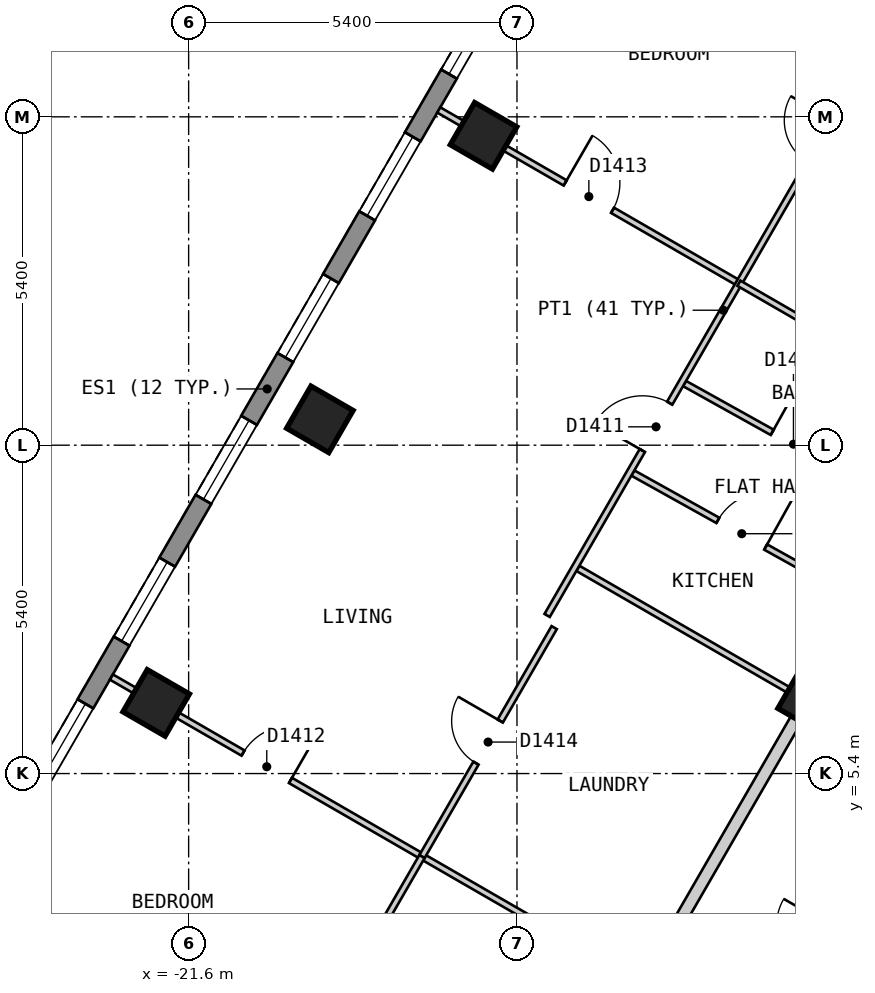
"""IFC4 building model, lengths in metres.
Left out: names, types, materials, properties, quantities, classifications, styles, units other than length and angle.
Written with IfcOpenShell. Run it as: python <this file> out.ifc"""

import sys

from ifc_helpers import new_model, si_unit, direction, frame, frame_2d, origin, origin_2d, place, context, subcontext, project, spatial, polyline, rectangle, outline, extrude, element, fill, save


model = new_model("IFC4")
c1 = context("Model", 3, precision=1e-05, world=origin(), true_north=direction((0.0, 1.0)))
c2 = subcontext(c1, "Body", "Model", "MODEL_VIEW")
j1 = project(units=[si_unit("LENGTHUNIT", "METRE"), si_unit("PLANEANGLEUNIT", "RADIAN")], contexts=[c1])
p1 = place(None, origin())
s1 = spatial("IfcSite", under=j1, at=p1, CompositionType="ELEMENT")
p2 = place(p1, origin())
s2 = spatial("IfcBuilding", under=s1, at=p2, CompositionType="ELEMENT")
p3 = place(p2, frame((0.0, 0.0, 178.2)))
s3 = spatial("IfcBuildingStorey", under=s2, at=p3, CompositionType="ELEMENT", Elevation=178.2)
for number, where, z_axis, x_axis in (
    (1, (-16.75, 15.888, 0.0), (0.0, 0.0, 1.0), (-0.5, -0.866, 0.0)),
    (2, (-19.442, 11.225, 0.0), (0.0, 0.0, 1.0), (-0.5, -0.866, 0.0)),
    (3, (-22.134, 6.562, 0.0), (0.0, 0.0, 1.0), (-0.5, -0.866, 0.0)),
):
    element("IfcColumn", number, at=place(p3, frame(where, z_axis=z_axis, x_axis=x_axis)), inside=s3, PredefinedType="COLUMN", context=c2, shape_type="SweptSolid", body=[
        extrude(rectangle(XDim=0.8, YDim=0.8, at=origin_2d()), origin(), (0.0, 0.0, 1.0), 3.0),
    ])
p4 = place(p3, frame((-11.431, 6.6, 0.0), z_axis=(0.0, 0.0, 1.0), x_axis=(-0.5, -0.866025403784, 0.0)))
e4 = element("IfcColumn", 4, at=p4, inside=s3, PredefinedType="COLUMN", context=c2, shape_type="SweptSolid", body=[
    extrude(rectangle(XDim=0.7, YDim=0.7, at=origin_2d()), origin(), (0.0, 0.0, 1.0), 3.0),
])
p5 = place(p3, frame((-14.592, 21.625, 0.0), z_axis=(0.0, 0.0, 1.0), x_axis=(-0.500010537973, -0.866019319597, 0.0)))
e5 = element("IfcWall", 5, at=p5, inside=s3, PredefinedType="SOLIDWALL", context=c2, shape_type="SweptSolid", body=[
    extrude(outline(polyline([(0.0, -0.15), (22.863, -0.15), (22.783, 0.15), (0.08, 0.15), (0.0, -0.15)])), origin(), (0.0, 0.0, 1.0), 2.7),
])
p6 = place(p5, frame((1.259, 0.0, 0.15)))
e6 = element("IfcOpeningElement", 6, at=p6, cuts=e5, PredefinedType="OPENING", context=c2, shape_type="SweptSolid", body=[
    extrude(rectangle(XDim=1.5, YDim=2.1, at=frame_2d((0.75, 1.05))), frame((0.0, 0.16, 0.0), z_axis=(0.0, -1.0, 0.0), x_axis=(1.0, 0.0, 0.0)), (0.0, 0.0, 1.0), 0.32),
])
p7 = place(p5, frame((3.952, 0.0, 0.15)))
e7 = element("IfcOpeningElement", 7, at=p7, cuts=e5, PredefinedType="OPENING", context=c2, shape_type="SweptSolid", body=[
    extrude(rectangle(XDim=1.5, YDim=2.1, at=frame_2d((0.75, 1.05))), frame((0.0, 0.16, 0.0), z_axis=(0.0, -1.0, 0.0), x_axis=(1.0, 0.0, 0.0)), (0.0, 0.0, 1.0), 0.32),
])
p8 = place(p5, frame((6.644, 0.0, 0.15)))
e8 = element("IfcOpeningElement", 8, at=p8, cuts=e5, PredefinedType="OPENING", context=c2, shape_type="SweptSolid", body=[
    extrude(rectangle(XDim=1.5, YDim=2.1, at=frame_2d((0.75, 1.05))), frame((0.0, 0.16, 0.0), z_axis=(0.0, -1.0, 0.0), x_axis=(1.0, 0.0, 0.0)), (0.0, 0.0, 1.0), 0.32),
])
p9 = place(p5, frame((9.335, 0.0, 0.15)))
e9 = element("IfcOpeningElement", 9, at=p9, cuts=e5, PredefinedType="OPENING", context=c2, shape_type="SweptSolid", body=[
    extrude(rectangle(XDim=1.5, YDim=2.1, at=frame_2d((0.75, 1.05))), frame((0.0, 0.16, 0.0), z_axis=(0.0, -1.0, 0.0), x_axis=(1.0, 0.0, 0.0)), (0.0, 0.0, 1.0), 0.32),
])
p10 = place(p5, frame((12.028, 0.0, 0.15)))
e10 = element("IfcOpeningElement", 10, at=p10, cuts=e5, PredefinedType="OPENING", context=c2, shape_type="SweptSolid", body=[
    extrude(rectangle(XDim=1.5, YDim=2.1, at=frame_2d((0.75, 1.05))), frame((0.0, 0.16, 0.0), z_axis=(0.0, -1.0, 0.0), x_axis=(1.0, 0.0, 0.0)), (0.0, 0.0, 1.0), 0.32),
])
p11 = place(p5, frame((14.72, 0.0, 0.15)))
e11 = element("IfcOpeningElement", 11, at=p11, cuts=e5, PredefinedType="OPENING", context=c2, shape_type="SweptSolid", body=[
    extrude(rectangle(XDim=1.5, YDim=2.1, at=frame_2d((0.75, 1.05))), frame((0.0, 0.16, 0.0), z_axis=(0.0, -1.0, 0.0), x_axis=(1.0, 0.0, 0.0)), (0.0, 0.0, 1.0), 0.32),
])
p12 = place(p5, frame((17.411, 0.0, 0.15)))
e12 = element("IfcOpeningElement", 12, at=p12, cuts=e5, PredefinedType="OPENING", context=c2, shape_type="SweptSolid", body=[
    extrude(rectangle(XDim=1.5, YDim=2.1, at=frame_2d((0.75, 1.05))), frame((0.0, 0.16, 0.0), z_axis=(0.0, -1.0, 0.0), x_axis=(1.0, 0.0, 0.0)), (0.0, 0.0, 1.0), 0.32),
])
p13 = place(p5, frame((20.104, 0.0, 0.15)))
e13 = element("IfcOpeningElement", 13, at=p13, cuts=e5, PredefinedType="OPENING", context=c2, shape_type="SweptSolid", body=[
    extrude(rectangle(XDim=1.5, YDim=2.1, at=frame_2d((0.75, 1.05))), frame((0.0, 0.16, 0.0), z_axis=(0.0, -1.0, 0.0), x_axis=(1.0, 0.0, 0.0)), (0.0, 0.0, 1.0), 0.32),
])
p14 = place(p3, frame((-13.048, -0.601, 0.0), z_axis=(0.0, 0.0, 1.0), x_axis=(0.499982180423, 0.866035691677, 0.0)))
e14 = element("IfcWall", 14, at=p14, inside=s3, PredefinedType="PARTITIONING", context=c2, shape_type="SweptSolid", body=[
    extrude(rectangle(XDim=7.16, YDim=0.2, at=frame_2d((3.58, 0.0))), origin(), (0.0, 0.0, 1.0), 2.7),
])
p15 = place(p14, frame((3.13, 0.0, 0.0)))
e15 = element("IfcOpeningElement", 15, at=p15, cuts=e14, PredefinedType="OPENING", context=c2, shape_type="SweptSolid", body=[
    extrude(rectangle(XDim=0.9, YDim=2.1, at=frame_2d((0.45, 1.05))), frame((0.0, 0.11, 0.0), z_axis=(0.0, -1.0, 0.0), x_axis=(1.0, 0.0, 0.0)), (0.0, 0.0, 1.0), 0.22),
])
p16 = place(p3, frame((-15.53, -0.501, 0.0), z_axis=(0.0, 0.0, 1.0), x_axis=(0.499952498232, 0.866052827206, 0.0)))
e16 = element("IfcWall", 16, at=p16, inside=s3, PredefinedType="PARTITIONING", context=c2, shape_type="SweptSolid", body=[
    extrude(rectangle(XDim=9.585, YDim=0.2, at=frame_2d((4.792, 0.0))), origin(), (0.0, 0.0, 1.0), 2.7),
])
p17 = place(p3, frame((-13.444, 11.814, 0.0), z_axis=(0.0, 0.0, 1.0), x_axis=(0.873653620945, -0.486548405207, 0.0)))
e17 = element("IfcWall", 17, at=p17, inside=s3, PredefinedType="PARTITIONING", context=c2, shape_type="SweptSolid", body=[
    extrude(rectangle(XDim=4.051, YDim=0.1, at=frame_2d((2.025, 0.0))), origin(), (0.0, 0.0, 1.0), 2.7),
])
p18 = place(p17, frame((1.65, 0.0, 0.0)))
e18 = element("IfcOpeningElement", 18, at=p18, cuts=e17, PredefinedType="OPENING", context=c2, shape_type="SweptSolid", body=[
    extrude(rectangle(XDim=0.8, YDim=2.1, at=frame_2d((0.4, 1.05))), frame((0.0, 0.06, 0.0), z_axis=(0.0, -1.0, 0.0), x_axis=(1.0, 0.0, 0.0)), (0.0, 0.0, 1.0), 0.12),
])
p19 = place(p3, frame((-14.294, 10.342, 0.0), z_axis=(0.0, 0.0, 1.0), x_axis=(0.873582256032, -0.486676527013, 0.0)))
e19 = element("IfcWall", 19, at=p19, inside=s3, PredefinedType="PARTITIONING", context=c2, shape_type="SweptSolid", body=[
    extrude(rectangle(XDim=4.05, YDim=0.1, at=frame_2d((2.025, 0.0))), origin(), (0.0, 0.0, 1.0), 2.7),
])
p20 = place(p19, frame((1.6, 0.0, 0.0)))
e20 = element("IfcOpeningElement", 20, at=p20, cuts=e19, PredefinedType="OPENING", context=c2, shape_type="SweptSolid", body=[
    extrude(rectangle(XDim=0.9, YDim=2.1, at=frame_2d((0.45, 1.05))), frame((0.0, 0.06, 0.0), z_axis=(0.0, -1.0, 0.0), x_axis=(1.0, 0.0, 0.0)), (0.0, 0.0, 1.0), 0.12),
])
p21 = place(p3, frame((-22.87, 6.987, 0.0), z_axis=(0.0, 0.0, 1.0), x_axis=(0.866022959057, -0.500004234368, 0.0)))
e21 = element("IfcWall", 21, at=p21, inside=s3, PredefinedType="PARTITIONING", context=c2, shape_type="SweptSolid", body=[
    extrude(rectangle(XDim=10.0, YDim=0.1, at=frame_2d((5.0, 0.0))), origin(), (0.0, 0.0, 1.0), 2.7),
])
p22 = place(p21, frame((2.5, 0.0, 0.0)))
e22 = element("IfcOpeningElement", 22, at=p22, cuts=e21, PredefinedType="OPENING", context=c2, shape_type="SweptSolid", body=[
    extrude(rectangle(XDim=0.9, YDim=2.1, at=frame_2d((0.45, 1.05))), frame((0.0, 0.06, 0.0), z_axis=(0.0, -1.0, 0.0), x_axis=(1.0, 0.0, 0.0)), (0.0, 0.0, 1.0), 0.12),
])
p23 = place(p3, frame((-15.199, 8.775, 0.0), z_axis=(0.0, 0.0, 1.0), x_axis=(0.866043063166, -0.499969411806, 0.0)))
e23 = element("IfcWall", 23, at=p23, inside=s3, PredefinedType="PARTITIONING", context=c2, shape_type="SweptSolid", body=[
    extrude(rectangle(XDim=4.25, YDim=0.1, at=frame_2d((2.125, 0.0))), origin(), (0.0, 0.0, 1.0), 2.7),
])
p24 = place(p3, frame((-17.486, 16.313, 0.0), z_axis=(0.0, 0.0, 1.0), x_axis=(0.866004402611, -0.500036373335, 0.0)))
e24 = element("IfcWall", 24, at=p24, inside=s3, PredefinedType="PARTITIONING", context=c2, shape_type="SweptSolid", body=[
    extrude(rectangle(XDim=5.7, YDim=0.1, at=frame_2d((2.85, 0.0))), origin(), (0.0, 0.0, 1.0), 2.7),
])
p25 = place(p24, frame((2.4, 0.0, 0.0)))
e25 = element("IfcOpeningElement", 25, at=p25, cuts=e24, PredefinedType="OPENING", context=c2, shape_type="SweptSolid", body=[
    extrude(rectangle(XDim=0.9, YDim=2.1, at=frame_2d((0.45, 1.05))), frame((0.0, 0.06, 0.0), z_axis=(0.0, -1.0, 0.0), x_axis=(1.0, 0.0, 0.0)), (0.0, 0.0, 1.0), 0.12),
])
p26 = place(p3, frame((-19.283, 1.4, 0.0), z_axis=(0.0, 0.0, 1.0), x_axis=(0.499847391584, 0.866113494368, 0.0)))
e26 = element("IfcWall", 26, at=p26, inside=s3, PredefinedType="PARTITIONING", context=c2, shape_type="SweptSolid", body=[
    extrude(rectangle(XDim=3.045, YDim=0.1, at=frame_2d((1.522, 0.0))), origin(), (0.0, 0.0, 1.0), 2.7),
])
p27 = place(p26, frame((1.123, 0.0, 0.0)))
e27 = element("IfcOpeningElement", 27, at=p27, cuts=e26, PredefinedType="OPENING", context=c2, shape_type="SweptSolid", body=[
    extrude(rectangle(XDim=0.8, YDim=2.1, at=frame_2d((0.4, 1.05))), frame((0.0, 0.06, 0.0), z_axis=(0.0, -1.0, 0.0), x_axis=(1.0, 0.0, 0.0)), (0.0, 0.0, 1.0), 0.12),
])
p28 = place(p3, frame((-15.704, 8.0, 0.0), z_axis=(0.0, 0.0, 1.0), x_axis=(0.500005637941, 0.866022148693, 0.0)))
e28 = element("IfcWall", 28, at=p28, inside=s3, PredefinedType="PARTITIONING", context=c2, shape_type="SweptSolid", body=[
    extrude(rectangle(XDim=11.592, YDim=0.1, at=frame_2d((5.796, 0.0))), origin(), (0.0, 0.0, 1.0), 2.7),
])
p29 = place(p28, frame((3.132, 0.0, 0.0)))
e29 = element("IfcOpeningElement", 29, at=p29, cuts=e28, PredefinedType="OPENING", context=c2, shape_type="SweptSolid", body=[
    extrude(rectangle(XDim=0.9, YDim=2.1, at=frame_2d((0.45, 1.05))), frame((0.0, 0.06, 0.0), z_axis=(0.0, -1.0, 0.0), x_axis=(1.0, 0.0, 0.0)), (0.0, 0.0, 1.0), 0.12),
])
p30 = place(p28, frame((8.6, 0.0, 0.0)))
e30 = element("IfcOpeningElement", 30, at=p30, cuts=e28, PredefinedType="OPENING", context=c2, shape_type="SweptSolid", body=[
    extrude(rectangle(XDim=0.8, YDim=2.1, at=frame_2d((0.4, 1.05))), frame((0.0, 0.06, 0.0), z_axis=(0.0, -1.0, 0.0), x_axis=(1.0, 0.0, 0.0)), (0.0, 0.0, 1.0), 0.12),
])
p31 = place(p3, frame((-17.761, 4.037, 0.0), z_axis=(0.0, 0.0, 1.0), x_axis=(0.50009692756, 0.865969435399, 0.0)))
e31 = element("IfcWall", 31, at=p31, inside=s3, PredefinedType="PARTITIONING", context=c2, shape_type="SweptSolid", body=[
    extrude(rectangle(XDim=4.345, YDim=0.1, at=frame_2d((2.173, 0.0))), origin(), (0.0, 0.0, 1.0), 2.7),
])
p32 = place(p31, frame((1.772, 0.0, 0.0)))
e32 = element("IfcOpeningElement", 32, at=p32, cuts=e31, PredefinedType="OPENING", context=c2, shape_type="SweptSolid", body=[
    extrude(rectangle(XDim=0.8, YDim=2.1, at=frame_2d((0.4, 1.05))), frame((0.0, 0.06, 0.0), z_axis=(0.0, -1.0, 0.0), x_axis=(1.0, 0.0, 0.0)), (0.0, 0.0, 1.0), 0.12),
])
p33 = place(p3, frame((-12.55, 13.463, 0.0), z_axis=(0.0, 0.0, 1.0), x_axis=(0.86606561423, -0.499930346997, 0.0)))
e33 = element("IfcWall", 33, at=p33, inside=s3, PredefinedType="PARTITIONING", context=c2, shape_type="SweptSolid", body=[
    extrude(rectangle(XDim=4.1, YDim=0.1, at=frame_2d((2.05, 0.0))), origin(), (0.0, 0.0, 1.0), 2.7),
])
p34 = place(p7, origin())
e34 = element("IfcWindow", 34, at=p34, inside=s3, PartitioningType="SINGLE_PANEL", PredefinedType="WINDOW", context=c2, shape_type="SweptSolid", body=[
    extrude(rectangle(XDim=1.5, YDim=2.1, at=frame_2d((0.75, 1.05))), frame((0.0, 0.03, 0.0), z_axis=(0.0, -1.0, 0.0), x_axis=(1.0, 0.0, 0.0)), (0.0, 0.0, 1.0), 0.06),
])
fill(e7, e34)
p35 = place(p8, origin())
e35 = element("IfcWindow", 35, at=p35, inside=s3, PartitioningType="SINGLE_PANEL", PredefinedType="WINDOW", context=c2, shape_type="SweptSolid", body=[
    extrude(rectangle(XDim=1.5, YDim=2.1, at=frame_2d((0.75, 1.05))), frame((0.0, 0.03, 0.0), z_axis=(0.0, -1.0, 0.0), x_axis=(1.0, 0.0, 0.0)), (0.0, 0.0, 1.0), 0.06),
])
fill(e8, e35)
p36 = place(p9, origin())
e36 = element("IfcWindow", 36, at=p36, inside=s3, PartitioningType="SINGLE_PANEL", PredefinedType="WINDOW", context=c2, shape_type="SweptSolid", body=[
    extrude(rectangle(XDim=1.5, YDim=2.1, at=frame_2d((0.75, 1.05))), frame((0.0, 0.03, 0.0), z_axis=(0.0, -1.0, 0.0), x_axis=(1.0, 0.0, 0.0)), (0.0, 0.0, 1.0), 0.06),
])
fill(e9, e36)
p37 = place(p10, origin())
e37 = element("IfcWindow", 37, at=p37, inside=s3, PartitioningType="SINGLE_PANEL", PredefinedType="WINDOW", context=c2, shape_type="SweptSolid", body=[
    extrude(rectangle(XDim=1.5, YDim=2.1, at=frame_2d((0.75, 1.05))), frame((0.0, 0.03, 0.0), z_axis=(0.0, -1.0, 0.0), x_axis=(1.0, 0.0, 0.0)), (0.0, 0.0, 1.0), 0.06),
])
fill(e10, e37)
p38 = place(p11, origin())
e38 = element("IfcWindow", 38, at=p38, inside=s3, PartitioningType="SINGLE_PANEL", PredefinedType="WINDOW", context=c2, shape_type="SweptSolid", body=[
    extrude(rectangle(XDim=1.5, YDim=2.1, at=frame_2d((0.75, 1.05))), frame((0.0, 0.03, 0.0), z_axis=(0.0, -1.0, 0.0), x_axis=(1.0, 0.0, 0.0)), (0.0, 0.0, 1.0), 0.06),
])
fill(e11, e38)
p39 = place(p12, origin())
e39 = element("IfcWindow", 39, at=p39, inside=s3, PartitioningType="SINGLE_PANEL", PredefinedType="WINDOW", context=c2, shape_type="SweptSolid", body=[
    extrude(rectangle(XDim=1.5, YDim=2.1, at=frame_2d((0.75, 1.05))), frame((0.0, 0.03, 0.0), z_axis=(0.0, -1.0, 0.0), x_axis=(1.0, 0.0, 0.0)), (0.0, 0.0, 1.0), 0.06),
])
fill(e12, e39)
p40 = place(p18, origin())
e40 = element("IfcDoor", 40, at=p40, inside=s3, OperationType="SINGLE_SWING_LEFT", PredefinedType="DOOR", context=c2, shape_type="SweptSolid", body=[
    extrude(rectangle(XDim=0.8, YDim=2.1, at=frame_2d((0.4, 1.05))), frame((0.0, 0.025, 0.0), z_axis=(0.0, -1.0, 0.0), x_axis=(1.0, 0.0, 0.0)), (0.0, 0.0, 1.0), 0.05),
])
fill(e18, e40)
p41 = place(p20, origin())
e41 = element("IfcDoor", 41, at=p41, inside=s3, OperationType="SINGLE_SWING_RIGHT", PredefinedType="DOOR", context=c2, shape_type="SweptSolid", body=[
    extrude(rectangle(XDim=0.9, YDim=2.1, at=frame_2d((0.45, 1.05))), frame((0.0, 0.025, 0.0), z_axis=(0.0, -1.0, 0.0), x_axis=(1.0, 0.0, 0.0)), (0.0, 0.0, 1.0), 0.05),
])
fill(e20, e41)
p42 = place(p29, origin())
e42 = element("IfcDoor", 42, at=p42, inside=s3, OperationType="SINGLE_SWING_LEFT", PredefinedType="DOOR", context=c2, shape_type="SweptSolid", body=[
    extrude(rectangle(XDim=0.9, YDim=2.1, at=frame_2d((0.45, 1.05))), frame((0.0, 0.025, 0.0), z_axis=(0.0, -1.0, 0.0), x_axis=(1.0, 0.0, 0.0)), (0.0, 0.0, 1.0), 0.05),
])
fill(e29, e42)
p43 = place(p22, origin())
e43 = element("IfcDoor", 43, at=p43, inside=s3, OperationType="SINGLE_SWING_RIGHT", PredefinedType="DOOR", context=c2, shape_type="SweptSolid", body=[
    extrude(rectangle(XDim=0.9, YDim=2.1, at=frame_2d((0.45, 1.05))), frame((0.0, 0.025, 0.0), z_axis=(0.0, -1.0, 0.0), x_axis=(1.0, 0.0, 0.0)), (0.0, 0.0, 1.0), 0.05),
])
fill(e22, e43)
p44 = place(p25, origin())
e44 = element("IfcDoor", 44, at=p44, inside=s3, OperationType="SINGLE_SWING_LEFT", PredefinedType="DOOR", context=c2, shape_type="SweptSolid", body=[
    extrude(rectangle(XDim=0.9, YDim=2.1, at=frame_2d((0.45, 1.05))), frame((0.0, 0.025, 0.0), z_axis=(0.0, -1.0, 0.0), x_axis=(1.0, 0.0, 0.0)), (0.0, 0.0, 1.0), 0.05),
])
fill(e25, e44)
p45 = place(p32, origin())
e45 = element("IfcDoor", 45, at=p45, inside=s3, OperationType="SINGLE_SWING_RIGHT", PredefinedType="DOOR", context=c2, shape_type="SweptSolid", body=[
    extrude(rectangle(XDim=0.8, YDim=2.1, at=frame_2d((0.4, 1.05))), frame((0.0, 0.025, 0.0), z_axis=(0.0, -1.0, 0.0), x_axis=(1.0, 0.0, 0.0)), (0.0, 0.0, 1.0), 0.05),
])
fill(e32, e45)
save(model, sys.argv[1])
